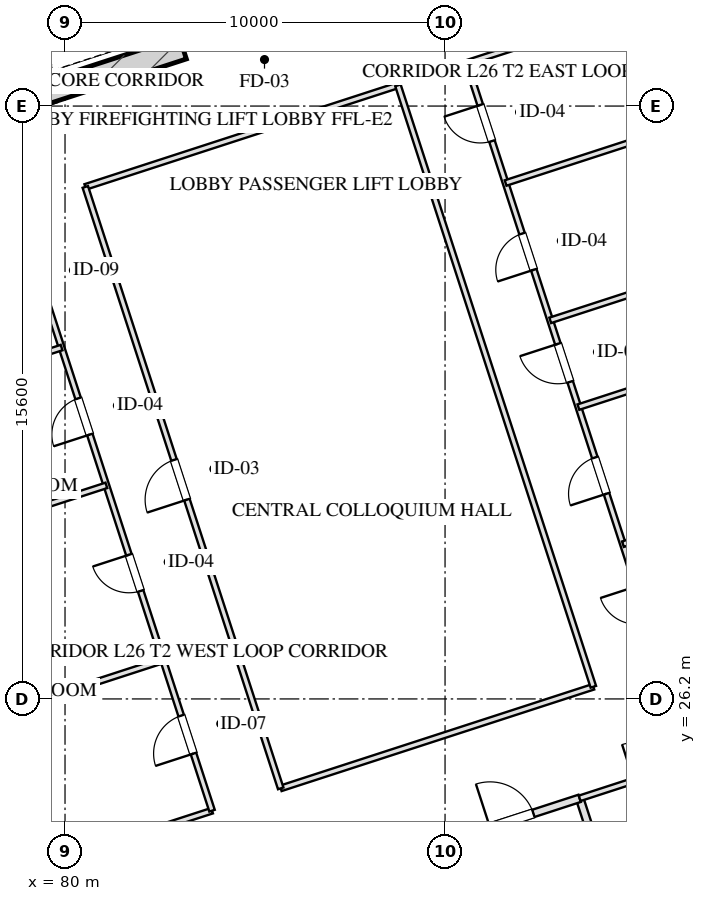
"""IFC4 building model, lengths in metres.
Left out: names, types, materials, properties, quantities, classifications, styles, units other than length and angle.
Written with IfcOpenShell. Run it as: python <this file> out.ifc"""

import sys

from ifc_helpers import new_model, si_unit, direction, frame, frame_2d, origin, place, context, subcontext, project, spatial, rectangle, extrude, element, fill, save


model = new_model("IFC4")
c1 = context("Model", 3, precision=1e-05, world=origin(), true_north=direction((0.0, 1.0)))
c2 = subcontext(c1, "Body", "Model", "MODEL_VIEW")
j1 = project(units=[si_unit("LENGTHUNIT", "METRE"), si_unit("PLANEANGLEUNIT", "RADIAN")], contexts=[c1])
p1 = place(None, origin())
s1 = spatial("IfcSite", under=j1, at=p1, CompositionType="ELEMENT")
p2 = place(p1, origin())
s2 = spatial("IfcBuilding", under=s1, at=p2, CompositionType="ELEMENT")
p3 = place(p2, frame((0.0, 0.0, 103.5)))
s3 = spatial("IfcBuildingStorey", under=s2, at=p3, CompositionType="ELEMENT", Elevation=103.5)
p4 = place(p3, frame((79.466, 41.828, 0.0), z_axis=(0.0, 0.0, 1.0), x_axis=(-0.309041232772, 0.951048640421, 0.0)))
e1 = element("IfcWall", 1, at=p4, inside=s3, PredefinedType="SHEAR", context=c2, shape_type="SweptSolid", body=[
    extrude(rectangle(XDim=9.48, YDim=0.6, at=frame_2d((4.74, 0.0))), origin(), (0.0, 0.0, 1.0), 3.45),
])
p5 = place(p3, frame((79.087, 42.021, 0.0), z_axis=(0.0, 0.0, 1.0), x_axis=(0.951062550203, 0.3089984233, 0.0)))
e2 = element("IfcWall", 2, at=p5, inside=s3, PredefinedType="SHEAR", context=c2, shape_type="SweptSolid", body=[
    extrude(rectangle(XDim=4.22, YDim=0.6, at=frame_2d((2.11, 0.0))), origin(), (0.0, 0.0, 1.0), 3.45),
])
p6 = place(p3, frame((80.716, 6.59, 0.0), z_axis=(0.0, 0.0, 1.0), x_axis=(-0.309017542002, 0.95105633836, 0.0)))
e3 = element("IfcWall", 3, at=p6, inside=s3, PredefinedType="SOLIDWALL", context=c2, shape_type="SweptSolid", body=[
    extrude(rectangle(XDim=46.4, YDim=0.4, at=frame_2d((23.2, 0.0))), origin(), (0.0, 0.0, 1.0), 2.61),
])
p7 = place(p6, frame((24.6, 0.0, 0.75)))
e4 = element("IfcOpeningElement", 4, at=p7, cuts=e3, PredefinedType="OPENING", context=c2, shape_type="SweptSolid", body=[
    extrude(rectangle(XDim=2.4, YDim=1.46, at=frame_2d((1.2, 0.73))), frame((0.0, 0.21, 0.0), z_axis=(0.0, -1.0, 0.0), x_axis=(1.0, 0.0, 0.0)), (0.0, 0.0, 1.0), 0.42),
])
p8 = place(p6, frame((28.4, 0.0, 0.75)))
e5 = element("IfcOpeningElement", 5, at=p8, cuts=e3, PredefinedType="OPENING", context=c2, shape_type="SweptSolid", body=[
    extrude(rectangle(XDim=2.4, YDim=1.46, at=frame_2d((1.2, 0.73))), frame((0.0, 0.21, 0.0), z_axis=(0.0, -1.0, 0.0), x_axis=(1.0, 0.0, 0.0)), (0.0, 0.0, 1.0), 0.42),
])
p9 = place(p6, frame((16.77, 0.0, 0.0)))
e6 = element("IfcOpeningElement", 6, at=p9, cuts=e3, PredefinedType="OPENING", context=c2, shape_type="SweptSolid", body=[
    extrude(rectangle(XDim=1.1, YDim=2.15, at=frame_2d((0.55, 1.075))), frame((0.0, 0.21, 0.0), z_axis=(0.0, -1.0, 0.0), x_axis=(1.0, 0.0, 0.0)), (0.0, 0.0, 1.0), 0.42),
])
p10 = place(p3, frame((93.542, 23.585, 0.0), z_axis=(0.0, 0.0, 1.0), x_axis=(0.309042196757, -0.951048327176, 0.0)))
e7 = element("IfcWall", 7, at=p10, inside=s3, PredefinedType="PARTITIONING", context=c2, shape_type="SweptSolid", body=[
    extrude(rectangle(XDim=8.43, YDim=0.2, at=frame_2d((4.215, 0.0))), origin(), (0.0, 0.0, 1.0), 3.175),
])
p11 = place(p3, frame((89.899, 22.401, 0.0), z_axis=(0.0, 0.0, 1.0), x_axis=(0.951046716504, 0.309047153403, 0.0)))
e8 = element("IfcWall", 8, at=p11, inside=s3, PredefinedType="PARTITIONING", context=c2, shape_type="SweptSolid", body=[
    extrude(rectangle(XDim=3.83, YDim=0.2, at=frame_2d((1.915, 0.0))), origin(), (0.0, 0.0, 1.0), 3.175),
])
p12 = place(p11, frame((1.35, 0.0, 0.0)))
e9 = element("IfcOpeningElement", 9, at=p12, cuts=e8, PredefinedType="OPENING", context=c2, shape_type="SweptSolid", body=[
    extrude(rectangle(XDim=1.2, YDim=2.05, at=frame_2d((0.6, 1.025))), frame((0.0, 0.11, 0.0), z_axis=(0.0, -1.0, 0.0), x_axis=(1.0, 0.0, 0.0)), (0.0, 0.0, 1.0), 0.22),
])
p13 = place(p3, frame((93.542, 23.585, 0.0), z_axis=(0.0, 0.0, 1.0), x_axis=(0.951063829732, 0.308994485023, 0.0)))
e10 = element("IfcWall", 10, at=p13, inside=s3, PredefinedType="PARTITIONING", context=c2, shape_type="SweptSolid", body=[
    extrude(rectangle(XDim=4.4, YDim=0.15, at=frame_2d((2.2, 0.0))), origin(), (0.0, 0.0, 1.0), 3.175),
])
p14 = place(p13, frame((1.5, 0.0, 0.0)))
e11 = element("IfcOpeningElement", 11, at=p14, cuts=e10, PredefinedType="OPENING", context=c2, shape_type="SweptSolid", body=[
    extrude(rectangle(XDim=1.0, YDim=2.05, at=frame_2d((0.5, 1.025))), frame((0.0, 0.085, 0.0), z_axis=(0.0, -1.0, 0.0), x_axis=(1.0, 0.0, 0.0)), (0.0, 0.0, 1.0), 0.17),
])
p15 = place(p3, frame((76.308, 20.803, 0.0), z_axis=(0.0, 0.0, 1.0), x_axis=(0.95105437725, 0.3090235776, 0.0)))
e12 = element("IfcWall", 12, at=p15, inside=s3, PredefinedType="PARTITIONING", context=c2, shape_type="SweptSolid", body=[
    extrude(rectangle(XDim=7.95, YDim=0.15, at=frame_2d((3.975, 0.0))), origin(), (0.0, 0.0, 1.0), 3.175),
])
p16 = place(p3, frame((85.676, 23.847, 0.0), z_axis=(0.0, 0.0, 1.0), x_axis=(0.951063309554, 0.308996086091, 0.0)))
e13 = element("IfcWall", 13, at=p16, inside=s3, PredefinedType="PARTITIONING", context=c2, shape_type="SweptSolid", body=[
    extrude(rectangle(XDim=8.65, YDim=0.15, at=frame_2d((4.325, 0.0))), origin(), (0.0, 0.0, 1.0), 3.175),
])
p17 = place(p3, frame((80.534, 39.672, 0.0), z_axis=(0.0, 0.0, 1.0), x_axis=(0.951052319652, 0.309029910015, 0.0)))
e14 = element("IfcWall", 14, at=p17, inside=s3, PredefinedType="PARTITIONING", context=c2, shape_type="SweptSolid", body=[
    extrude(rectangle(XDim=8.65, YDim=0.15, at=frame_2d((4.325, 0.0))), origin(), (0.0, 0.0, 1.0), 3.175),
])
p18 = place(p3, frame((90.567, 42.933, 0.0), z_axis=(0.0, 0.0, 1.0), x_axis=(0.951058377365, 0.309011266531, 0.0)))
e15 = element("IfcWall", 15, at=p18, inside=s3, PredefinedType="PARTITIONING", context=c2, shape_type="SweptSolid", body=[
    extrude(rectangle(XDim=13.8, YDim=0.15, at=frame_2d((6.9, 0.0))), origin(), (0.0, 0.0, 1.0), 3.175),
])
p19 = place(p3, frame((83.869, 23.26, 0.0), z_axis=(0.0, 0.0, 1.0), x_axis=(-0.309022042254, 0.951054876125, 0.0)))
e16 = element("IfcWall", 16, at=p19, inside=s3, PredefinedType="PARTITIONING", context=c2, shape_type="SweptSolid", body=[
    extrude(rectangle(XDim=16.64, YDim=0.15, at=frame_2d((8.32, 0.0))), origin(), (0.0, 0.0, 1.0), 3.175),
])
p20 = place(p19, frame((1.58, 0.0, 0.0)))
e17 = element("IfcOpeningElement", 17, at=p20, cuts=e16, PredefinedType="OPENING", context=c2, shape_type="SweptSolid", body=[
    extrude(rectangle(XDim=1.05, YDim=2.05, at=frame_2d((0.525, 1.025))), frame((0.0, 0.085, 0.0), z_axis=(0.0, -1.0, 0.0), x_axis=(1.0, 0.0, 0.0)), (0.0, 0.0, 1.0), 0.17),
])
p21 = place(p19, frame((6.08, 0.0, 0.0)))
e18 = element("IfcOpeningElement", 18, at=p21, cuts=e16, PredefinedType="OPENING", context=c2, shape_type="SweptSolid", body=[
    extrude(rectangle(XDim=1.0, YDim=2.05, at=frame_2d((0.5, 1.025))), frame((0.0, 0.085, 0.0), z_axis=(0.0, -1.0, 0.0), x_axis=(1.0, 0.0, 0.0)), (0.0, 0.0, 1.0), 0.17),
])
p22 = place(p19, frame((10.406, 0.0, 0.0)))
e19 = element("IfcOpeningElement", 19, at=p22, cuts=e16, PredefinedType="OPENING", context=c2, shape_type="SweptSolid", body=[
    extrude(rectangle(XDim=1.0, YDim=2.05, at=frame_2d((0.5, 1.025))), frame((0.0, 0.085, 0.0), z_axis=(0.0, -1.0, 0.0), x_axis=(1.0, 0.0, 0.0)), (0.0, 0.0, 1.0), 0.17),
])
p23 = place(p19, frame((14.226, 0.0, 0.0)))
e20 = element("IfcOpeningElement", 20, at=p23, cuts=e16, PredefinedType="OPENING", context=c2, shape_type="SweptSolid", body=[
    extrude(rectangle(XDim=0.85, YDim=2.05, at=frame_2d((0.425, 1.025))), frame((0.0, 0.085, 0.0), z_axis=(0.0, -1.0, 0.0), x_axis=(1.0, 0.0, 0.0)), (0.0, 0.0, 1.0), 0.17),
])
p24 = place(p3, frame((85.676, 23.847, 0.0), z_axis=(0.0, 0.0, 1.0), x_axis=(-0.309008771245, 0.951059188113, 0.0)))
e21 = element("IfcWall", 21, at=p24, inside=s3, PredefinedType="PARTITIONING", context=c2, shape_type="SweptSolid", body=[
    extrude(rectangle(XDim=16.64, YDim=0.15, at=frame_2d((8.32, 0.0))), origin(), (0.0, 0.0, 1.0), 3.175),
])
p25 = place(p24, frame((7.987, 0.0, 0.0)))
e22 = element("IfcOpeningElement", 22, at=p25, cuts=e21, PredefinedType="OPENING", context=c2, shape_type="SweptSolid", body=[
    extrude(rectangle(XDim=1.1, YDim=2.05, at=frame_2d((0.55, 1.025))), frame((0.0, 0.085, 0.0), z_axis=(0.0, -1.0, 0.0), x_axis=(1.0, 0.0, 0.0)), (0.0, 0.0, 1.0), 0.17),
])
p26 = place(p3, frame((93.903, 26.52, 0.0), z_axis=(0.0, 0.0, 1.0), x_axis=(-0.30901773025, 0.951056277195, 0.0)))
e23 = element("IfcWall", 23, at=p26, inside=s3, PredefinedType="PARTITIONING", context=c2, shape_type="SweptSolid", body=[
    extrude(rectangle(XDim=16.64, YDim=0.15, at=frame_2d((8.32, 0.0))), origin(), (0.0, 0.0, 1.0), 3.175),
])
p27 = place(p3, frame((95.709, 27.107, 0.0), z_axis=(0.0, 0.0, 1.0), x_axis=(-0.30901773025, 0.951056277195, 0.0)))
e24 = element("IfcWall", 24, at=p27, inside=s3, PredefinedType="PARTITIONING", context=c2, shape_type="SweptSolid", body=[
    extrude(rectangle(XDim=16.64, YDim=0.15, at=frame_2d((8.32, 0.0))), origin(), (0.0, 0.0, 1.0), 3.175),
])
p28 = place(p27, frame((1.164, 0.0, 0.0)))
e25 = element("IfcOpeningElement", 25, at=p28, cuts=e24, PredefinedType="OPENING", context=c2, shape_type="SweptSolid", body=[
    extrude(rectangle(XDim=1.0, YDim=2.05, at=frame_2d((0.5, 1.025))), frame((0.0, 0.085, 0.0), z_axis=(0.0, -1.0, 0.0), x_axis=(1.0, 0.0, 0.0)), (0.0, 0.0, 1.0), 0.17),
])
p29 = place(p27, frame((4.724, 0.0, 0.0)))
e26 = element("IfcOpeningElement", 26, at=p29, cuts=e24, PredefinedType="OPENING", context=c2, shape_type="SweptSolid", body=[
    extrude(rectangle(XDim=1.0, YDim=2.05, at=frame_2d((0.5, 1.025))), frame((0.0, 0.085, 0.0), z_axis=(0.0, -1.0, 0.0), x_axis=(1.0, 0.0, 0.0)), (0.0, 0.0, 1.0), 0.17),
])
p30 = place(p27, frame((7.82, 0.0, 0.0)))
e27 = element("IfcOpeningElement", 27, at=p30, cuts=e24, PredefinedType="OPENING", context=c2, shape_type="SweptSolid", body=[
    extrude(rectangle(XDim=1.05, YDim=2.05, at=frame_2d((0.525, 1.025))), frame((0.0, 0.085, 0.0), z_axis=(0.0, -1.0, 0.0), x_axis=(1.0, 0.0, 0.0)), (0.0, 0.0, 1.0), 0.17),
])
p31 = place(p27, frame((10.92, 0.0, 0.0)))
e28 = element("IfcOpeningElement", 28, at=p31, cuts=e24, PredefinedType="OPENING", context=c2, shape_type="SweptSolid", body=[
    extrude(rectangle(XDim=1.0, YDim=2.05, at=frame_2d((0.5, 1.025))), frame((0.0, 0.085, 0.0), z_axis=(0.0, -1.0, 0.0), x_axis=(1.0, 0.0, 0.0)), (0.0, 0.0, 1.0), 0.17),
])
p32 = place(p27, frame((14.48, 0.0, 0.0)))
e29 = element("IfcOpeningElement", 29, at=p32, cuts=e24, PredefinedType="OPENING", context=c2, shape_type="SweptSolid", body=[
    extrude(rectangle(XDim=1.0, YDim=2.05, at=frame_2d((0.5, 1.025))), frame((0.0, 0.085, 0.0), z_axis=(0.0, -1.0, 0.0), x_axis=(1.0, 0.0, 0.0)), (0.0, 0.0, 1.0), 0.17),
])
for number, where, z_axis, x_axis in (
    (30, (75.022, 24.76, 0.0), (0.0, 0.0, 1.0), (0.951, 0.309, 0.0)),
    (31, (73.527, 29.363, 0.0), (0.0, 0.0, 1.0), (0.951, 0.309, 0.0)),
    (32, (72.349, 32.989, 0.0), (0.0, 0.0, 1.0), (0.951, 0.309, 0.0)),
):
    element("IfcWall", number, at=place(p3, frame(where, z_axis=z_axis, x_axis=x_axis)), inside=s3, PredefinedType="PARTITIONING", context=c2, shape_type="SweptSolid", body=[
        extrude(rectangle(XDim=7.95, YDim=0.15, at=frame_2d((3.975, 0.0))), origin(), (0.0, 0.0, 1.0), 3.175),
    ])
p33 = place(p3, frame((94.681, 30.272, 0.0), z_axis=(0.0, 0.0, 1.0), x_axis=(0.951051488548, 0.309032467762, 0.0)))
e33 = element("IfcWall", 33, at=p33, inside=s3, PredefinedType="PARTITIONING", context=c2, shape_type="SweptSolid", body=[
    extrude(rectangle(XDim=13.8, YDim=0.15, at=frame_2d((6.9, 0.0))), origin(), (0.0, 0.0, 1.0), 3.175),
])
p34 = place(p3, frame((93.509, 33.878, 0.0), z_axis=(0.0, 0.0, 1.0), x_axis=(0.951056688031, 0.309016465825, 0.0)))
e34 = element("IfcWall", 34, at=p34, inside=s3, PredefinedType="PARTITIONING", context=c2, shape_type="SweptSolid", body=[
    extrude(rectangle(XDim=13.8, YDim=0.15, at=frame_2d((6.9, 0.0))), origin(), (0.0, 0.0, 1.0), 3.175),
])
p35 = place(p3, frame((92.768, 36.161, 0.0), z_axis=(0.0, 0.0, 1.0), x_axis=(0.951058377365, 0.309011266531, 0.0)))
e35 = element("IfcWall", 35, at=p35, inside=s3, PredefinedType="PARTITIONING", context=c2, shape_type="SweptSolid", body=[
    extrude(rectangle(XDim=13.8, YDim=0.15, at=frame_2d((6.9, 0.0))), origin(), (0.0, 0.0, 1.0), 3.175),
])
p36 = place(p3, frame((91.594, 39.775, 0.0), z_axis=(0.0, 0.0, 1.0), x_axis=(0.951056688031, 0.309016465825, 0.0)))
e36 = element("IfcWall", 36, at=p36, inside=s3, PredefinedType="PARTITIONING", context=c2, shape_type="SweptSolid", body=[
    extrude(rectangle(XDim=13.8, YDim=0.15, at=frame_2d((6.9, 0.0))), origin(), (0.0, 0.0, 1.0), 3.175),
])
p37 = place(p12, origin())
e37 = element("IfcDoor", 37, at=p37, inside=s3, OperationType="SINGLE_SWING_LEFT", PredefinedType="DOOR", context=c2, shape_type="SweptSolid", body=[
    extrude(rectangle(XDim=1.2, YDim=2.05, at=frame_2d((0.6, 1.025))), frame((0.0, 0.025, 0.0), z_axis=(0.0, -1.0, 0.0), x_axis=(1.0, 0.0, 0.0)), (0.0, 0.0, 1.0), 0.05),
])
fill(e9, e37)
p38 = place(p20, origin())
e38 = element("IfcDoor", 38, at=p38, inside=s3, OperationType="SINGLE_SWING_LEFT", PredefinedType="DOOR", context=c2, shape_type="SweptSolid", body=[
    extrude(rectangle(XDim=1.05, YDim=2.05, at=frame_2d((0.525, 1.025))), frame((0.0, 0.025, 0.0), z_axis=(0.0, -1.0, 0.0), x_axis=(1.0, 0.0, 0.0)), (0.0, 0.0, 1.0), 0.05),
])
fill(e17, e38)
p39 = place(p21, origin())
e39 = element("IfcDoor", 39, at=p39, inside=s3, OperationType="SINGLE_SWING_RIGHT", PredefinedType="DOOR", context=c2, shape_type="SweptSolid", body=[
    extrude(rectangle(XDim=1.0, YDim=2.05, at=frame_2d((0.5, 1.025))), frame((0.0, 0.025, 0.0), z_axis=(0.0, -1.0, 0.0), x_axis=(1.0, 0.0, 0.0)), (0.0, 0.0, 1.0), 0.05),
])
fill(e18, e39)
p40 = place(p22, origin())
e40 = element("IfcDoor", 40, at=p40, inside=s3, OperationType="SINGLE_SWING_LEFT", PredefinedType="DOOR", context=c2, shape_type="SweptSolid", body=[
    extrude(rectangle(XDim=1.0, YDim=2.05, at=frame_2d((0.5, 1.025))), frame((0.0, 0.025, 0.0), z_axis=(0.0, -1.0, 0.0), x_axis=(1.0, 0.0, 0.0)), (0.0, 0.0, 1.0), 0.05),
])
fill(e19, e40)
p41 = place(p25, origin())
e41 = element("IfcDoor", 41, at=p41, inside=s3, OperationType="SINGLE_SWING_LEFT", PredefinedType="DOOR", context=c2, shape_type="SweptSolid", body=[
    extrude(rectangle(XDim=1.1, YDim=2.05, at=frame_2d((0.55, 1.025))), frame((0.0, 0.025, 0.0), z_axis=(0.0, -1.0, 0.0), x_axis=(1.0, 0.0, 0.0)), (0.0, 0.0, 1.0), 0.05),
])
fill(e22, e41)
p42 = place(p29, origin())
e42 = element("IfcDoor", 42, at=p42, inside=s3, OperationType="SINGLE_SWING_LEFT", PredefinedType="DOOR", context=c2, shape_type="SweptSolid", body=[
    extrude(rectangle(XDim=1.0, YDim=2.05, at=frame_2d((0.5, 1.025))), frame((0.0, 0.025, 0.0), z_axis=(0.0, -1.0, 0.0), x_axis=(1.0, 0.0, 0.0)), (0.0, 0.0, 1.0), 0.05),
])
fill(e26, e42)
p43 = place(p30, origin())
e43 = element("IfcDoor", 43, at=p43, inside=s3, OperationType="SINGLE_SWING_RIGHT", PredefinedType="DOOR", context=c2, shape_type="SweptSolid", body=[
    extrude(rectangle(XDim=1.05, YDim=2.05, at=frame_2d((0.525, 1.025))), frame((0.0, 0.025, 0.0), z_axis=(0.0, -1.0, 0.0), x_axis=(1.0, 0.0, 0.0)), (0.0, 0.0, 1.0), 0.05),
])
fill(e27, e43)
p44 = place(p31, origin())
e44 = element("IfcDoor", 44, at=p44, inside=s3, OperationType="SINGLE_SWING_LEFT", PredefinedType="DOOR", context=c2, shape_type="SweptSolid", body=[
    extrude(rectangle(XDim=1.0, YDim=2.05, at=frame_2d((0.5, 1.025))), frame((0.0, 0.025, 0.0), z_axis=(0.0, -1.0, 0.0), x_axis=(1.0, 0.0, 0.0)), (0.0, 0.0, 1.0), 0.05),
])
fill(e28, e44)
p45 = place(p32, origin())
e45 = element("IfcDoor", 45, at=p45, inside=s3, OperationType="SINGLE_SWING_RIGHT", PredefinedType="DOOR", context=c2, shape_type="SweptSolid", body=[
    extrude(rectangle(XDim=1.0, YDim=2.05, at=frame_2d((0.5, 1.025))), frame((0.0, 0.025, 0.0), z_axis=(0.0, -1.0, 0.0), x_axis=(1.0, 0.0, 0.0)), (0.0, 0.0, 1.0), 0.05),
])
fill(e29, e45)
save(model, sys.argv[1])
